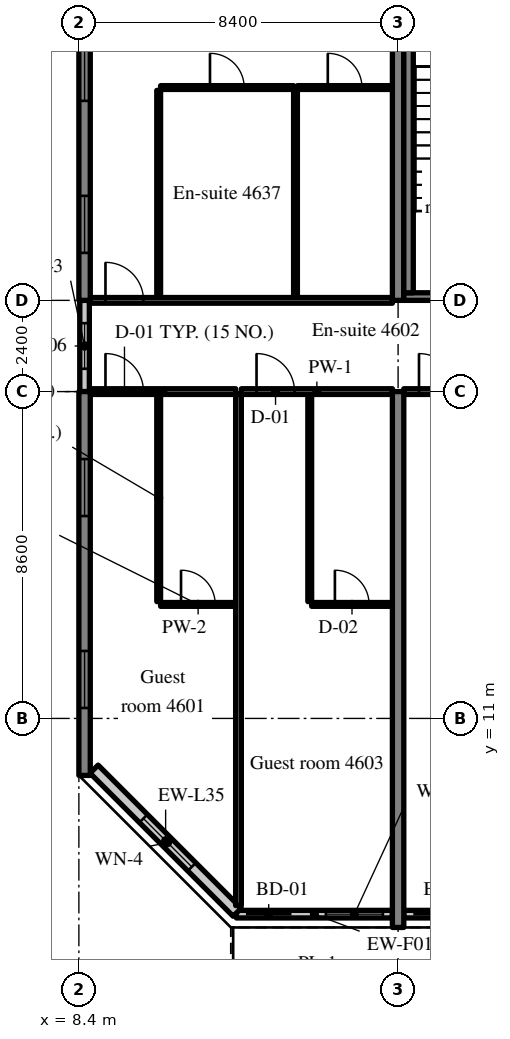
"""IFC4 building model, lengths in metres.
Left out: names, types, materials, properties, quantities, classifications, styles, units other than length and angle.
Written with IfcOpenShell. Run it as: python <this file> out.ifc"""

import sys

from ifc_helpers import new_model, si_unit, direction, frame, frame_2d, origin, place, context, subcontext, project, spatial, rectangle, extrude, source, transform, mapped, element, fill, save


model = new_model("IFC4")
c1 = context("Model", 3, precision=1e-05, world=origin(), true_north=direction((0.0, 1.0)))
c2 = subcontext(c1, "Body", "Model", "MODEL_VIEW")
j1 = project(units=[si_unit("LENGTHUNIT", "METRE"), si_unit("PLANEANGLEUNIT", "RADIAN")], contexts=[c1])
p1 = place(None, origin())
s1 = spatial("IfcSite", under=j1, at=p1, CompositionType="ELEMENT")
p2 = place(p1, origin())
s2 = spatial("IfcBuilding", under=s1, at=p2, CompositionType="ELEMENT")
p3 = place(p2, frame((0.0, 0.0, 189.6)))
s3 = spatial("IfcBuildingStorey", under=s2, at=p3, CompositionType="ELEMENT", Elevation=189.6)
m1 = source(origin(), c2, "Body", "SweptSolid", [
    extrude(rectangle(XDim=10.1, YDim=0.3, at=frame_2d((5.05, 0.0))), origin(), (0.0, 0.0, 1.0), 3.52),
])
p4 = place(p3, frame((8.55, 9.5, 0.0), z_axis=(0.0, 0.0, 1.0), x_axis=(0.0, 1.0, 0.0)))
e1 = element("IfcWall", 1, at=p4, inside=s3, PredefinedType="SHEAR", context=c2, shape_type="MappedRepresentation", body=[
    mapped(m1, transform((0.0, 0.0, 0.0), scale=1.0)),
])
m2 = source(origin(), c2, "Body", "SweptSolid", [
    extrude(rectangle(XDim=1.5, YDim=1.5, at=frame_2d((0.75, 0.75))), frame((0.0, 0.16, 0.0), z_axis=(0.0, -1.0, 0.0), x_axis=(1.0, 0.0, 0.0)), (0.0, 0.0, 1.0), 0.32),
])
p5 = place(p4, frame((1.775, 0.0, 0.9)))
e2 = element("IfcOpeningElement", 2, at=p5, cuts=e1, PredefinedType="OPENING", context=c2, shape_type="MappedRepresentation", body=[
    mapped(m2, transform((0.0, 0.0, 0.0), scale=1.0)),
])
p6 = place(p4, frame((6.825, 0.0, 0.9)))
e3 = element("IfcOpeningElement", 3, at=p6, cuts=e1, PredefinedType="OPENING", context=c2, shape_type="MappedRepresentation", body=[
    mapped(m2, transform((0.0, 0.0, 0.0), scale=1.0)),
])
m3 = source(origin(), c2, "Body", "SweptSolid", [
    extrude(rectangle(XDim=16.0, YDim=0.3, at=frame_2d((8.0, 0.0))), origin(), (0.0, 0.0, 1.0), 3.52),
])
p7 = place(p3, frame((8.55, 22.0, 0.0), z_axis=(0.0, 0.0, 1.0), x_axis=(0.0, 1.0, 0.0)))
e4 = element("IfcWall", 4, at=p7, inside=s3, PredefinedType="SHEAR", context=c2, shape_type="MappedRepresentation", body=[
    mapped(m3, transform((0.0, 0.0, 0.0), scale=1.0)),
])
p8 = place(p7, frame((1.25, 0.0, 0.9)))
e5 = element("IfcOpeningElement", 5, at=p8, cuts=e4, PredefinedType="OPENING", context=c2, shape_type="MappedRepresentation", body=[
    mapped(m2, transform((0.0, 0.0, 0.0), scale=1.0)),
])
p9 = place(p7, frame((5.25, 0.0, 0.9)))
e6 = element("IfcOpeningElement", 6, at=p9, cuts=e4, PredefinedType="OPENING", context=c2, shape_type="MappedRepresentation", body=[
    mapped(m2, transform((0.0, 0.0, 0.0), scale=1.0)),
])
p10 = place(p7, frame((9.25, 0.0, 0.9)))
e7 = element("IfcOpeningElement", 7, at=p10, cuts=e4, PredefinedType="OPENING", context=c2, shape_type="MappedRepresentation", body=[
    mapped(m2, transform((0.0, 0.0, 0.0), scale=1.0)),
])
p11 = place(p7, frame((13.25, 0.0, 0.9)))
e8 = element("IfcOpeningElement", 8, at=p11, cuts=e4, PredefinedType="OPENING", context=c2, shape_type="MappedRepresentation", body=[
    mapped(m2, transform((0.0, 0.0, 0.0), scale=1.0)),
])
m4 = source(origin(), c2, "Body", "SweptSolid", [
    extrude(rectangle(XDim=14.1, YDim=0.3, at=frame_2d((7.05, 0.0))), origin(), (0.0, 0.0, 1.0), 3.52),
])
p12 = place(p3, frame((16.8, 5.5, 0.0), z_axis=(0.0, 0.0, 1.0), x_axis=(0.0, 1.0, 0.0)))
e9 = element("IfcWall", 9, at=p12, inside=s3, PredefinedType="SHEAR", context=c2, shape_type="MappedRepresentation", body=[
    mapped(m4, transform((0.0, 0.0, 0.0), scale=1.0)),
])
m5 = source(origin(), c2, "Body", "SweptSolid", [
    extrude(rectangle(XDim=20.0, YDim=0.3, at=frame_2d((10.0, 0.0))), origin(), (0.0, 0.0, 1.0), 3.52),
])
p13 = place(p3, frame((16.8, 22.0, 0.0), z_axis=(0.0, 0.0, 1.0), x_axis=(0.0, 1.0, 0.0)))
e10 = element("IfcWall", 10, at=p13, inside=s3, PredefinedType="SHEAR", context=c2, shape_type="MappedRepresentation", body=[
    mapped(m5, transform((0.0, 0.0, 0.0), scale=1.0)),
])
m6 = source(origin(), c2, "Body", "SweptSolid", [
    extrude(rectangle(XDim=4.105, YDim=0.2, at=frame_2d((2.052, 0.0))), origin(), (0.0, 0.0, 1.0), 2.87),
])
p14 = place(p3, frame((12.545, 5.85, 0.0), z_axis=(0.0, 0.0, 1.0), x_axis=(1.0, 0.0, 0.0)))
e11 = element("IfcWall", 11, at=p14, inside=s3, PredefinedType="SOLIDWALL", context=c2, shape_type="MappedRepresentation", body=[
    mapped(m6, transform((0.0, 0.0, 0.0), scale=1.0)),
])
m7 = source(origin(), c2, "Body", "SweptSolid", [
    extrude(rectangle(XDim=1.2, YDim=2.4, at=frame_2d((0.6, 1.2))), frame((0.0, 0.11, 0.0), z_axis=(0.0, -1.0, 0.0), x_axis=(1.0, 0.0, 0.0)), (0.0, 0.0, 1.0), 0.22),
])
p15 = place(p14, frame((0.25, 0.0, 0.0)))
e12 = element("IfcOpeningElement", 12, at=p15, cuts=e11, PredefinedType="OPENING", context=c2, shape_type="MappedRepresentation", body=[
    mapped(m7, transform((0.0, 0.0, 0.0), scale=1.0)),
])
m8 = source(origin(), c2, "Body", "SweptSolid", [
    extrude(rectangle(XDim=1.5, YDim=1.5, at=frame_2d((0.75, 0.75))), frame((0.0, 0.11, 0.0), z_axis=(0.0, -1.0, 0.0), x_axis=(1.0, 0.0, 0.0)), (0.0, 0.0, 1.0), 0.22),
])
p16 = place(p14, frame((2.355, 0.0, 0.9)))
e13 = element("IfcOpeningElement", 13, at=p16, cuts=e11, PredefinedType="OPENING", context=c2, shape_type="MappedRepresentation", body=[
    mapped(m8, transform((0.0, 0.0, 0.0), scale=1.0)),
])
m9 = source(origin(), c2, "Body", "SweptSolid", [
    extrude(rectangle(XDim=8.1, YDim=0.2, at=frame_2d((4.05, 0.0))), origin(), (0.0, 0.0, 1.0), 2.87),
])
p17 = place(p3, frame((16.95, 5.85, 0.0), z_axis=(0.0, 0.0, 1.0), x_axis=(1.0, 0.0, 0.0)))
e14 = element("IfcWall", 14, at=p17, inside=s3, PredefinedType="SOLIDWALL", context=c2, shape_type="MappedRepresentation", body=[
    mapped(m9, transform((0.0, 0.0, 0.0), scale=1.0)),
])
p18 = place(p17, frame((0.25, 0.0, 0.0)))
e15 = element("IfcOpeningElement", 15, at=p18, cuts=e14, PredefinedType="OPENING", context=c2, shape_type="MappedRepresentation", body=[
    mapped(m7, transform((0.0, 0.0, 0.0), scale=1.0)),
])
p19 = place(p17, frame((2.3, 0.0, 0.9)))
e16 = element("IfcOpeningElement", 16, at=p19, cuts=e14, PredefinedType="OPENING", context=c2, shape_type="MappedRepresentation", body=[
    mapped(m8, transform((0.0, 0.0, 0.0), scale=1.0)),
])
p20 = place(p17, frame((4.3, 0.0, 0.0)))
e17 = element("IfcOpeningElement", 17, at=p20, cuts=e14, PredefinedType="OPENING", context=c2, shape_type="MappedRepresentation", body=[
    mapped(m7, transform((0.0, 0.0, 0.0), scale=1.0)),
])
p21 = place(p17, frame((6.35, 0.0, 0.9)))
e18 = element("IfcOpeningElement", 18, at=p21, cuts=e14, PredefinedType="OPENING", context=c2, shape_type="MappedRepresentation", body=[
    mapped(m8, transform((0.0, 0.0, 0.0), scale=1.0)),
])
m10 = source(origin(), c2, "Body", "SweptSolid", [
    extrude(rectangle(XDim=5.326, YDim=0.3, at=frame_2d((2.663, 0.0))), origin(), (0.0, 0.0, 1.0), 3.52),
])
p22 = place(p3, frame((8.8, 9.666, 0.0), z_axis=(0.0, 0.0, 1.0), x_axis=(0.707083859269, -0.707129702361, 0.0)))
e19 = element("IfcWall", 19, at=p22, inside=s3, PredefinedType="SOLIDWALL", context=c2, shape_type="MappedRepresentation", body=[
    mapped(m10, transform((0.0, 0.0, 0.0), scale=1.0)),
])
m11 = source(origin(), c2, "Body", "SweptSolid", [
    extrude(rectangle(XDim=1.8, YDim=1.5, at=frame_2d((0.9, 0.75))), frame((0.0, 0.16, 0.0), z_axis=(0.0, -1.0, 0.0), x_axis=(1.0, 0.0, 0.0)), (0.0, 0.0, 1.0), 0.32),
])
p23 = place(p22, frame((1.836, 0.0, 0.9)))
e20 = element("IfcOpeningElement", 20, at=p23, cuts=e19, PredefinedType="OPENING", context=c2, shape_type="MappedRepresentation", body=[
    mapped(m11, transform((0.0, 0.0, 0.0), scale=1.0)),
])
m12 = source(origin(), c2, "Body", "SweptSolid", [
    extrude(rectangle(XDim=2.4, YDim=0.25, at=frame_2d((1.2, 0.0))), origin(), (0.0, 0.0, 1.0), 2.62),
])
p24 = place(p3, frame((8.55, 19.6, 0.0), z_axis=(0.0, 0.0, 1.0), x_axis=(0.0, 1.0, 0.0)))
e21 = element("IfcWall", 21, at=p24, inside=s3, PredefinedType="SOLIDWALL", context=c2, shape_type="MappedRepresentation", body=[
    mapped(m12, transform((0.0, 0.0, 0.0), scale=1.0)),
])
m13 = source(origin(), c2, "Body", "SweptSolid", [
    extrude(rectangle(XDim=1.2, YDim=1.5, at=frame_2d((0.6, 0.75))), frame((0.0, 0.135, 0.0), z_axis=(0.0, -1.0, 0.0), x_axis=(1.0, 0.0, 0.0)), (0.0, 0.0, 1.0), 0.27),
])
p25 = place(p24, frame((0.6, 0.0, 0.9)))
e22 = element("IfcOpeningElement", 22, at=p25, cuts=e21, PredefinedType="OPENING", context=c2, shape_type="MappedRepresentation", body=[
    mapped(m13, transform((0.0, 0.0, 0.0), scale=1.0)),
])
m14 = source(origin(), c2, "Body", "SweptSolid", [
    extrude(rectangle(XDim=8.25, YDim=0.2, at=frame_2d((4.125, 0.0))), origin(), (0.0, 0.0, 1.0), 3.52),
])
p26 = place(p3, frame((16.95, 22.1, 0.0), z_axis=(0.0, 0.0, 1.0), x_axis=(1.0, 0.0, 0.0)))
e23 = element("IfcWall", 23, at=p26, inside=s3, PredefinedType="SOLIDWALL", context=c2, shape_type="MappedRepresentation", body=[
    mapped(m14, transform((0.0, 0.0, 0.0), scale=1.0)),
])
m15 = source(origin(), c2, "Body", "SweptSolid", [
    extrude(rectangle(XDim=1.2, YDim=2.1, at=frame_2d((0.6, 1.05))), frame((0.0, 0.11, 0.0), z_axis=(0.0, -1.0, 0.0), x_axis=(1.0, 0.0, 0.0)), (0.0, 0.0, 1.0), 0.22),
])
p27 = place(p26, frame((6.05, 0.0, 0.0)))
e24 = element("IfcOpeningElement", 24, at=p27, cuts=e23, PredefinedType="OPENING", context=c2, shape_type="MappedRepresentation", body=[
    mapped(m15, transform((0.0, 0.0, 0.0), scale=1.0)),
])
m16 = source(origin(), c2, "Body", "SweptSolid", [
    extrude(rectangle(XDim=8.1, YDim=0.25, at=frame_2d((4.05, 0.0))), origin(), (0.0, 0.0, 1.0), 3.52),
])
p28 = place(p3, frame((17.075, 22.2, 0.0), z_axis=(0.0, 0.0, 1.0), x_axis=(0.0, 1.0, 0.0)))
e25 = element("IfcWall", 25, at=p28, inside=s3, PredefinedType="SOLIDWALL", context=c2, shape_type="MappedRepresentation", body=[
    mapped(m16, transform((0.0, 0.0, 0.0), scale=1.0)),
])
m17 = source(origin(), c2, "Body", "SweptSolid", [
    extrude(rectangle(XDim=5.45, YDim=0.1, at=frame_2d((2.725, 0.0))), origin(), (0.0, 0.0, 1.0), 3.52),
])
p29 = place(p3, frame((10.5, 14.075, 0.0), z_axis=(0.0, 0.0, 1.0), x_axis=(0.0, 1.0, 0.0)))
e26 = element("IfcWall", 26, at=p29, inside=s3, PredefinedType="PARTITIONING", context=c2, shape_type="MappedRepresentation", body=[
    mapped(m17, transform((0.0, 0.0, 0.0), scale=1.0)),
])
m18 = source(origin(), c2, "Body", "SweptSolid", [
    extrude(rectangle(XDim=1.975, YDim=0.1, at=frame_2d((0.987, 0.0))), origin(), (0.0, 0.0, 1.0), 3.52),
])
p30 = place(p3, frame((10.55, 14.0, 0.0), z_axis=(0.0, 0.0, 1.0), x_axis=(1.0, 0.0, 0.0)))
e27 = element("IfcWall", 27, at=p30, inside=s3, PredefinedType="PARTITIONING", context=c2, shape_type="MappedRepresentation", body=[
    mapped(m18, transform((0.0, 0.0, 0.0), scale=1.0)),
])
m19 = source(origin(), c2, "Body", "SweptSolid", [
    extrude(rectangle(XDim=0.9, YDim=2.1, at=frame_2d((0.45, 1.05))), frame((0.0, 0.06, 0.0), z_axis=(0.0, -1.0, 0.0), x_axis=(1.0, 0.0, 0.0)), (0.0, 0.0, 1.0), 0.12),
])
p31 = place(p30, frame((0.538, 0.0, 0.0)))
e28 = element("IfcOpeningElement", 28, at=p31, cuts=e27, PredefinedType="OPENING", context=c2, shape_type="MappedRepresentation", body=[
    mapped(m19, transform((0.0, 0.0, 0.0), scale=1.0)),
])
m20 = source(origin(), c2, "Body", "SweptSolid", [
    extrude(rectangle(XDim=3.825, YDim=0.15, at=frame_2d((1.913, 0.0))), origin(), (0.0, 0.0, 1.0), 2.82),
])
p32 = place(p3, frame((8.7, 19.6, 0.0), z_axis=(0.0, 0.0, 1.0), x_axis=(1.0, 0.0, 0.0)))
e29 = element("IfcWall", 29, at=p32, inside=s3, PredefinedType="PARTITIONING", context=c2, shape_type="MappedRepresentation", body=[
    mapped(m20, transform((0.0, 0.0, 0.0), scale=1.0)),
])
m21 = source(origin(), c2, "Body", "SweptSolid", [
    extrude(rectangle(XDim=1.0, YDim=2.1, at=frame_2d((0.5, 1.05))), frame((0.0, 0.085, 0.0), z_axis=(0.0, -1.0, 0.0), x_axis=(1.0, 0.0, 0.0)), (0.0, 0.0, 1.0), 0.17),
])
p33 = place(p32, frame((0.4, 0.0, 0.0)))
e30 = element("IfcOpeningElement", 30, at=p33, cuts=e29, PredefinedType="OPENING", context=c2, shape_type="MappedRepresentation", body=[
    mapped(m21, transform((0.0, 0.0, 0.0), scale=1.0)),
])
p34 = place(p3, frame((14.475, 14.075, 0.0), z_axis=(0.0, 0.0, 1.0), x_axis=(0.0, 1.0, 0.0)))
e31 = element("IfcWall", 31, at=p34, inside=s3, PredefinedType="PARTITIONING", context=c2, shape_type="MappedRepresentation", body=[
    mapped(m17, transform((0.0, 0.0, 0.0), scale=1.0)),
])
m22 = source(origin(), c2, "Body", "SweptSolid", [
    extrude(rectangle(XDim=2.125, YDim=0.1, at=frame_2d((1.062, 0.0))), origin(), (0.0, 0.0, 1.0), 3.52),
])
p35 = place(p3, frame((14.525, 14.0, 0.0), z_axis=(0.0, 0.0, 1.0), x_axis=(1.0, 0.0, 0.0)))
e32 = element("IfcWall", 32, at=p35, inside=s3, PredefinedType="PARTITIONING", context=c2, shape_type="MappedRepresentation", body=[
    mapped(m22, transform((0.0, 0.0, 0.0), scale=1.0)),
])
p36 = place(p35, frame((0.612, 0.0, 0.0)))
e33 = element("IfcOpeningElement", 33, at=p36, cuts=e32, PredefinedType="OPENING", context=c2, shape_type="MappedRepresentation", body=[
    mapped(m19, transform((0.0, 0.0, 0.0), scale=1.0)),
])
m23 = source(origin(), c2, "Body", "SweptSolid", [
    extrude(rectangle(XDim=3.975, YDim=0.15, at=frame_2d((1.987, 0.0))), origin(), (0.0, 0.0, 1.0), 2.82),
])
p37 = place(p3, frame((12.675, 19.6, 0.0), z_axis=(0.0, 0.0, 1.0), x_axis=(1.0, 0.0, 0.0)))
e34 = element("IfcWall", 34, at=p37, inside=s3, PredefinedType="PARTITIONING", context=c2, shape_type="MappedRepresentation", body=[
    mapped(m23, transform((0.0, 0.0, 0.0), scale=1.0)),
])
p38 = place(p37, frame((0.4, 0.0, 0.0)))
e35 = element("IfcOpeningElement", 35, at=p38, cuts=e34, PredefinedType="OPENING", context=c2, shape_type="MappedRepresentation", body=[
    mapped(m21, transform((0.0, 0.0, 0.0), scale=1.0)),
])
m24 = source(origin(), c2, "Body", "SweptSolid", [
    extrude(rectangle(XDim=13.447, YDim=0.15, at=frame_2d((6.724, 0.0))), origin(), (0.0, 0.0, 1.0), 3.52),
])
p39 = place(p3, frame((12.6, 6.078, 0.0), z_axis=(0.0, 0.0, 1.0), x_axis=(0.0, 1.0, 0.0)))
e36 = element("IfcWall", 36, at=p39, inside=s3, PredefinedType="PARTITIONING", context=c2, shape_type="MappedRepresentation", body=[
    mapped(m24, transform((0.0, 0.0, 0.0), scale=1.0)),
])
m25 = source(origin(), c2, "Body", "SweptSolid", [
    extrude(rectangle(XDim=8.1, YDim=0.15, at=frame_2d((4.05, 0.0))), origin(), (0.0, 0.0, 1.0), 2.82),
])
p40 = place(p3, frame((16.95, 19.6, 0.0), z_axis=(0.0, 0.0, 1.0), x_axis=(1.0, 0.0, 0.0)))
e37 = element("IfcWall", 37, at=p40, inside=s3, PredefinedType="PARTITIONING", context=c2, shape_type="MappedRepresentation", body=[
    mapped(m25, transform((0.0, 0.0, 0.0), scale=1.0)),
])
p41 = place(p40, frame((0.4, 0.0, 0.0)))
e38 = element("IfcOpeningElement", 38, at=p41, cuts=e37, PredefinedType="OPENING", context=c2, shape_type="MappedRepresentation", body=[
    mapped(m21, transform((0.0, 0.0, 0.0), scale=1.0)),
])
for number, where, z_axis, x_axis in (
    (39, (10.5, 22.075, 0.0), (0.0, 0.0, 1.0), (0.0, 1.0, 0.0)),
    (40, (14.1, 22.075, 0.0), (0.0, 0.0, 1.0), (0.0, 1.0, 0.0)),
):
    element("IfcWall", number, at=place(p3, frame(where, z_axis=z_axis, x_axis=x_axis)), inside=s3, PredefinedType="PARTITIONING", context=c2, shape_type="MappedRepresentation", body=[
        mapped(m17, transform((0.0, 0.0, 0.0), scale=1.0)),
    ])
m26 = source(origin(), c2, "Body", "SweptSolid", [
    extrude(rectangle(XDim=3.5, YDim=0.1, at=frame_2d((1.75, 0.0))), origin(), (0.0, 0.0, 1.0), 3.52),
])
p42 = place(p3, frame((10.55, 27.6, 0.0), z_axis=(0.0, 0.0, 1.0), x_axis=(1.0, 0.0, 0.0)))
e41 = element("IfcWall", 41, at=p42, inside=s3, PredefinedType="PARTITIONING", context=c2, shape_type="MappedRepresentation", body=[
    mapped(m26, transform((0.0, 0.0, 0.0), scale=1.0)),
])
p43 = place(p42, frame((1.3, 0.0, 0.0)))
e42 = element("IfcOpeningElement", 42, at=p43, cuts=e41, PredefinedType="OPENING", context=c2, shape_type="MappedRepresentation", body=[
    mapped(m19, transform((0.0, 0.0, 0.0), scale=1.0)),
])
m27 = source(origin(), c2, "Body", "SweptSolid", [
    extrude(rectangle(XDim=2.5, YDim=0.1, at=frame_2d((1.25, 0.0))), origin(), (0.0, 0.0, 1.0), 3.52),
])
p44 = place(p3, frame((14.15, 27.6, 0.0), z_axis=(0.0, 0.0, 1.0), x_axis=(1.0, 0.0, 0.0)))
e43 = element("IfcWall", 43, at=p44, inside=s3, PredefinedType="PARTITIONING", context=c2, shape_type="MappedRepresentation", body=[
    mapped(m27, transform((0.0, 0.0, 0.0), scale=1.0)),
])
p45 = place(p44, frame((0.8, 0.0, 0.0)))
e44 = element("IfcOpeningElement", 44, at=p45, cuts=e43, PredefinedType="OPENING", context=c2, shape_type="MappedRepresentation", body=[
    mapped(m19, transform((0.0, 0.0, 0.0), scale=1.0)),
])
m28 = source(origin(), c2, "Body", "SweptSolid", [
    extrude(rectangle(XDim=7.95, YDim=0.15, at=frame_2d((3.975, 0.0))), origin(), (0.0, 0.0, 1.0), 2.82),
])
p46 = place(p3, frame((8.7, 22.0, 0.0), z_axis=(0.0, 0.0, 1.0), x_axis=(1.0, 0.0, 0.0)))
e45 = element("IfcWall", 45, at=p46, inside=s3, PredefinedType="PARTITIONING", context=c2, shape_type="MappedRepresentation", body=[
    mapped(m28, transform((0.0, 0.0, 0.0), scale=1.0)),
])
p47 = place(p46, frame((0.4, 0.0, 0.0)))
e46 = element("IfcOpeningElement", 46, at=p47, cuts=e45, PredefinedType="OPENING", context=c2, shape_type="MappedRepresentation", body=[
    mapped(m21, transform((0.0, 0.0, 0.0), scale=1.0)),
])
m29 = source(origin(), c2, "Body", "SweptSolid", [
    extrude(rectangle(XDim=1.2, YDim=2.4, at=frame_2d((0.6, 1.2))), frame((0.0, 0.025, 0.0), z_axis=(0.0, -1.0, 0.0), x_axis=(1.0, 0.0, 0.0)), (0.0, 0.0, 1.0), 0.05),
])
p48 = place(p15, origin())
e47 = element("IfcDoor", 47, at=p48, inside=s3, OperationType="SLIDING_TO_LEFT", PredefinedType="DOOR", context=c2, shape_type="MappedRepresentation", body=[
    mapped(m29, transform((0.0, 0.0, 0.0), scale=1.0)),
])
fill(e12, e47)
m30 = source(origin(), c2, "Body", "SweptSolid", [
    extrude(rectangle(XDim=1.5, YDim=1.5, at=frame_2d((0.75, 0.75))), frame((0.0, 0.03, 0.0), z_axis=(0.0, -1.0, 0.0), x_axis=(1.0, 0.0, 0.0)), (0.0, 0.0, 1.0), 0.06),
])
p49 = place(p16, origin())
e48 = element("IfcWindow", 48, at=p49, inside=s3, PartitioningType="SINGLE_PANEL", PredefinedType="WINDOW", context=c2, shape_type="MappedRepresentation", body=[
    mapped(m30, transform((0.0, 0.0, 0.0), scale=1.0)),
])
fill(e13, e48)
p50 = place(p18, origin())
e49 = element("IfcDoor", 49, at=p50, inside=s3, OperationType="SLIDING_TO_RIGHT", PredefinedType="DOOR", context=c2, shape_type="MappedRepresentation", body=[
    mapped(m29, transform((0.0, 0.0, 0.0), scale=1.0)),
])
fill(e15, e49)
m31 = source(origin(), c2, "Body", "SweptSolid", [
    extrude(rectangle(XDim=1.8, YDim=1.5, at=frame_2d((0.9, 0.75))), frame((0.0, 0.03, 0.0), z_axis=(0.0, -1.0, 0.0), x_axis=(1.0, 0.0, 0.0)), (0.0, 0.0, 1.0), 0.06),
])
p51 = place(p23, origin())
e50 = element("IfcWindow", 50, at=p51, inside=s3, PartitioningType="SINGLE_PANEL", PredefinedType="WINDOW", context=c2, shape_type="MappedRepresentation", body=[
    mapped(m31, transform((0.0, 0.0, 0.0), scale=1.0)),
])
fill(e20, e50)
p52 = place(p5, origin())
e51 = element("IfcWindow", 51, at=p52, inside=s3, PartitioningType="SINGLE_PANEL", PredefinedType="WINDOW", context=c2, shape_type="MappedRepresentation", body=[
    mapped(m30, transform((0.0, 0.0, 0.0), scale=1.0)),
])
fill(e2, e51)
p53 = place(p6, origin())
e52 = element("IfcWindow", 52, at=p53, inside=s3, PartitioningType="SINGLE_PANEL", PredefinedType="WINDOW", context=c2, shape_type="MappedRepresentation", body=[
    mapped(m30, transform((0.0, 0.0, 0.0), scale=1.0)),
])
fill(e3, e52)
p54 = place(p8, origin())
e53 = element("IfcWindow", 53, at=p54, inside=s3, PartitioningType="SINGLE_PANEL", PredefinedType="WINDOW", context=c2, shape_type="MappedRepresentation", body=[
    mapped(m30, transform((0.0, 0.0, 0.0), scale=1.0)),
])
fill(e5, e53)
p55 = place(p9, origin())
e54 = element("IfcWindow", 54, at=p55, inside=s3, PartitioningType="SINGLE_PANEL", PredefinedType="WINDOW", context=c2, shape_type="MappedRepresentation", body=[
    mapped(m30, transform((0.0, 0.0, 0.0), scale=1.0)),
])
fill(e6, e54)
m32 = source(origin(), c2, "Body", "SweptSolid", [
    extrude(rectangle(XDim=1.2, YDim=1.5, at=frame_2d((0.6, 0.75))), frame((0.0, 0.03, 0.0), z_axis=(0.0, -1.0, 0.0), x_axis=(1.0, 0.0, 0.0)), (0.0, 0.0, 1.0), 0.06),
])
p56 = place(p25, origin())
e55 = element("IfcWindow", 55, at=p56, inside=s3, PartitioningType="SINGLE_PANEL", PredefinedType="WINDOW", context=c2, shape_type="MappedRepresentation", body=[
    mapped(m32, transform((0.0, 0.0, 0.0), scale=1.0)),
])
fill(e22, e55)
m33 = source(origin(), c2, "Body", "SweptSolid", [
    extrude(rectangle(XDim=0.9, YDim=2.1, at=frame_2d((0.45, 1.05))), frame((0.0, 0.025, 0.0), z_axis=(0.0, -1.0, 0.0), x_axis=(1.0, 0.0, 0.0)), (0.0, 0.0, 1.0), 0.05),
])
p57 = place(p31, origin())
e56 = element("IfcDoor", 56, at=p57, inside=s3, OperationType="SINGLE_SWING_LEFT", PredefinedType="DOOR", context=c2, shape_type="MappedRepresentation", body=[
    mapped(m33, transform((0.0, 0.0, 0.0), scale=1.0)),
])
fill(e28, e56)
m34 = source(origin(), c2, "Body", "SweptSolid", [
    extrude(rectangle(XDim=1.0, YDim=2.1, at=frame_2d((0.5, 1.05))), frame((0.0, 0.025, 0.0), z_axis=(0.0, -1.0, 0.0), x_axis=(1.0, 0.0, 0.0)), (0.0, 0.0, 1.0), 0.05),
])
p58 = place(p33, origin())
e57 = element("IfcDoor", 57, at=p58, inside=s3, OperationType="SINGLE_SWING_LEFT", PredefinedType="DOOR", context=c2, shape_type="MappedRepresentation", body=[
    mapped(m34, transform((0.0, 0.0, 0.0), scale=1.0)),
])
fill(e30, e57)
p59 = place(p36, origin())
e58 = element("IfcDoor", 58, at=p59, inside=s3, OperationType="SINGLE_SWING_LEFT", PredefinedType="DOOR", context=c2, shape_type="MappedRepresentation", body=[
    mapped(m33, transform((0.0, 0.0, 0.0), scale=1.0)),
])
fill(e33, e58)
p60 = place(p38, origin())
e59 = element("IfcDoor", 59, at=p60, inside=s3, OperationType="SINGLE_SWING_LEFT", PredefinedType="DOOR", context=c2, shape_type="MappedRepresentation", body=[
    mapped(m34, transform((0.0, 0.0, 0.0), scale=1.0)),
])
fill(e35, e59)
p61 = place(p41, origin())
e60 = element("IfcDoor", 60, at=p61, inside=s3, OperationType="SINGLE_SWING_LEFT", PredefinedType="DOOR", context=c2, shape_type="MappedRepresentation", body=[
    mapped(m34, transform((0.0, 0.0, 0.0), scale=1.0)),
])
fill(e38, e60)
p62 = place(p43, origin())
e61 = element("IfcDoor", 61, at=p62, inside=s3, OperationType="SINGLE_SWING_LEFT", PredefinedType="DOOR", context=c2, shape_type="MappedRepresentation", body=[
    mapped(m33, transform((0.0, 0.0, 0.0), scale=1.0)),
])
fill(e42, e61)
p63 = place(p45, origin())
e62 = element("IfcDoor", 62, at=p63, inside=s3, OperationType="SINGLE_SWING_LEFT", PredefinedType="DOOR", context=c2, shape_type="MappedRepresentation", body=[
    mapped(m33, transform((0.0, 0.0, 0.0), scale=1.0)),
])
fill(e44, e62)
p64 = place(p47, origin())
e63 = element("IfcDoor", 63, at=p64, inside=s3, OperationType="SINGLE_SWING_LEFT", PredefinedType="DOOR", context=c2, shape_type="MappedRepresentation", body=[
    mapped(m34, transform((0.0, 0.0, 0.0), scale=1.0)),
])
fill(e46, e63)
save(model, sys.argv[1])
